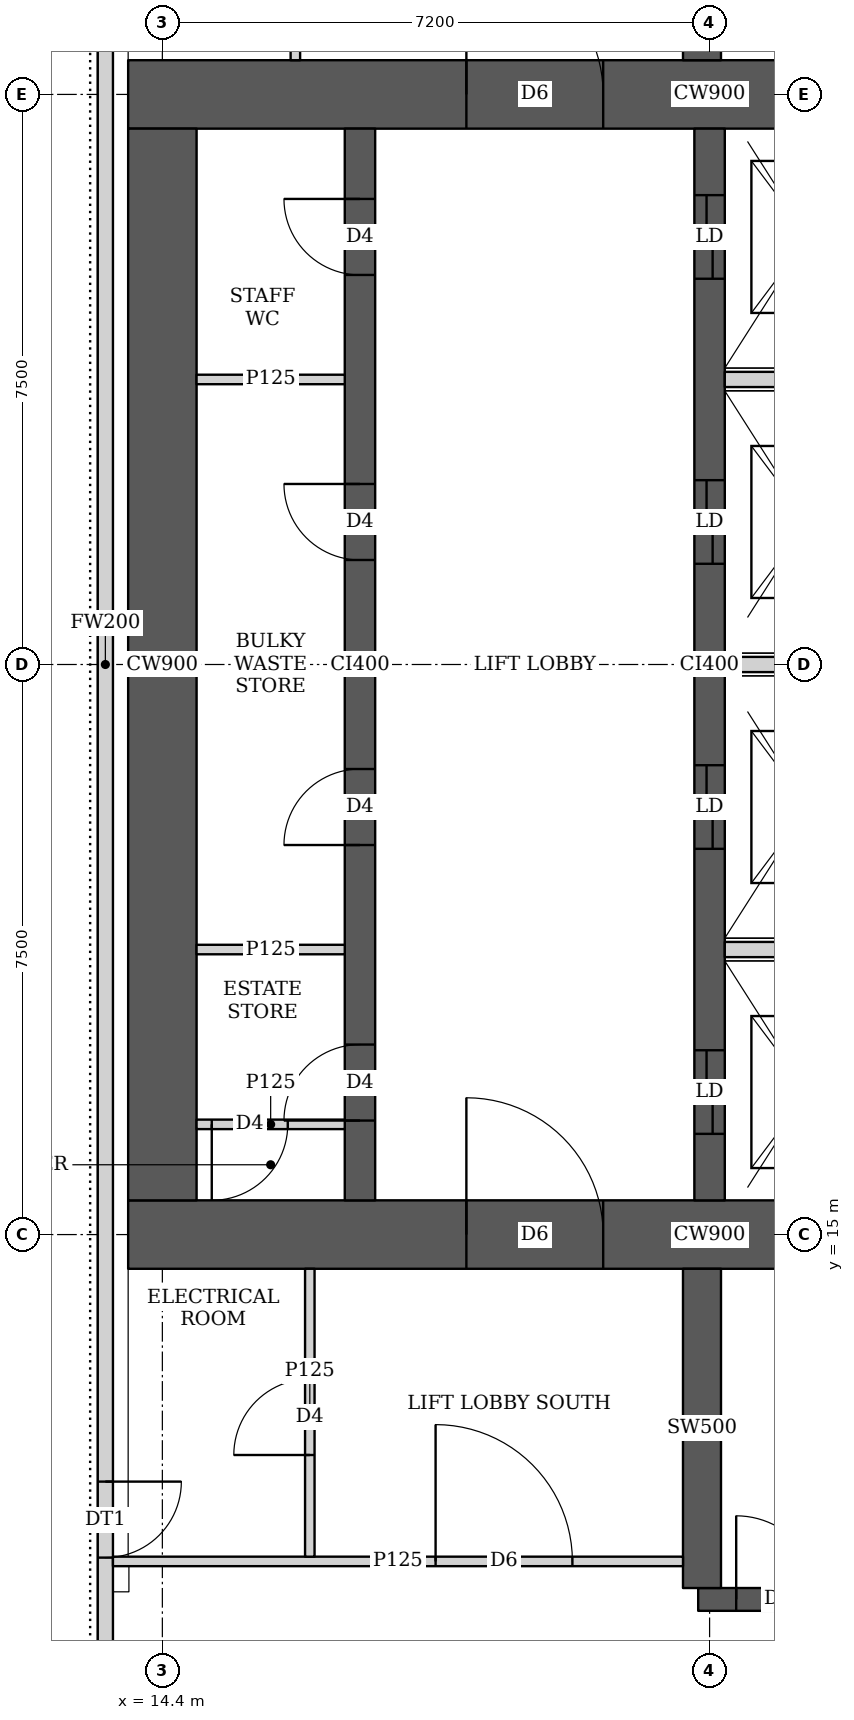
"""IFC4 building model, lengths in metres.
Left out: names, types, materials, properties, quantities, classifications, styles, units other than length and angle.
Written with IfcOpenShell. Run it as: python <this file> out.ifc"""

import sys

from ifc_helpers import new_model, si_unit, direction, frame, frame_2d, origin, place, context, subcontext, project, spatial, rectangle, extrude, element, fill, save


model = new_model("IFC4")
c1 = context("Model", 3, precision=1e-05, world=origin(), true_north=direction((0.0, 1.0)))
c2 = subcontext(c1, "Body", "Model", "MODEL_VIEW")
j1 = project(units=[si_unit("LENGTHUNIT", "METRE"), si_unit("PLANEANGLEUNIT", "RADIAN")], contexts=[c1])
p1 = place(None, origin())
s1 = spatial("IfcSite", under=j1, at=p1, CompositionType="ELEMENT")
p2 = place(p1, origin())
s2 = spatial("IfcBuilding", under=s1, at=p2, CompositionType="ELEMENT")
p3 = place(p2, frame((0.0, 0.0, 223.7)))
s3 = spatial("IfcBuildingStorey", under=s2, at=p3, CompositionType="ELEMENT", Elevation=223.7)
p4 = place(p3, frame((13.95, 15.0, 0.0), z_axis=(0.0, 0.0, 1.0), x_axis=(1.0, 0.0, 0.0)))
e1 = element("IfcWall", 1, at=p4, inside=s3, PredefinedType="SHEAR", context=c2, shape_type="SweptSolid", body=[
    extrude(rectangle(XDim=15.3, YDim=0.9, at=frame_2d((7.65, 0.0))), origin(), (0.0, 0.0, 1.0), 3.75),
])
p5 = place(p4, frame((4.45, 0.0, 0.0)))
e2 = element("IfcOpeningElement", 2, at=p5, cuts=e1, PredefinedType="OPENING", context=c2, shape_type="SweptSolid", body=[
    extrude(rectangle(XDim=1.8, YDim=2.1, at=frame_2d((0.9, 1.05))), frame((0.0, 0.46, 0.0), z_axis=(0.0, -1.0, 0.0), x_axis=(1.0, 0.0, 0.0)), (0.0, 0.0, 1.0), 0.92),
])
p6 = place(p4, frame((10.7, 0.0, 0.0)))
e3 = element("IfcOpeningElement", 3, at=p6, cuts=e1, PredefinedType="OPENING", context=c2, shape_type="SweptSolid", body=[
    extrude(rectangle(XDim=1.1, YDim=2.1, at=frame_2d((0.55, 1.05))), frame((0.0, 0.46, 0.0), z_axis=(0.0, -1.0, 0.0), x_axis=(1.0, 0.0, 0.0)), (0.0, 0.0, 1.0), 0.92),
])
p7 = place(p3, frame((13.95, 30.0, 0.0), z_axis=(0.0, 0.0, 1.0), x_axis=(1.0, 0.0, 0.0)))
e4 = element("IfcWall", 4, at=p7, inside=s3, PredefinedType="SHEAR", context=c2, shape_type="SweptSolid", body=[
    extrude(rectangle(XDim=15.3, YDim=0.9, at=frame_2d((7.65, 0.0))), origin(), (0.0, 0.0, 1.0), 3.75),
])
p8 = place(p7, frame((4.45, 0.0, 0.0)))
e5 = element("IfcOpeningElement", 5, at=p8, cuts=e4, PredefinedType="OPENING", context=c2, shape_type="SweptSolid", body=[
    extrude(rectangle(XDim=1.8, YDim=2.1, at=frame_2d((0.9, 1.05))), frame((0.0, 0.46, 0.0), z_axis=(0.0, -1.0, 0.0), x_axis=(1.0, 0.0, 0.0)), (0.0, 0.0, 1.0), 0.92),
])
p9 = place(p7, frame((10.7, 0.0, 0.0)))
e6 = element("IfcOpeningElement", 6, at=p9, cuts=e4, PredefinedType="OPENING", context=c2, shape_type="SweptSolid", body=[
    extrude(rectangle(XDim=1.1, YDim=2.1, at=frame_2d((0.55, 1.05))), frame((0.0, 0.46, 0.0), z_axis=(0.0, -1.0, 0.0), x_axis=(1.0, 0.0, 0.0)), (0.0, 0.0, 1.0), 0.92),
])
p10 = place(p3, frame((14.4, 15.45, 0.0), z_axis=(0.0, 0.0, 1.0), x_axis=(0.0, 1.0, 0.0)))
e7 = element("IfcWall", 7, at=p10, inside=s3, PredefinedType="SHEAR", context=c2, shape_type="SweptSolid", body=[
    extrude(rectangle(XDim=14.1, YDim=0.9, at=frame_2d((7.05, 0.0))), origin(), (0.0, 0.0, 1.0), 3.75),
])
p11 = place(p3, frame((17.0, 15.45, 0.0), z_axis=(0.0, 0.0, 1.0), x_axis=(0.0, 1.0, 0.0)))
e8 = element("IfcWall", 8, at=p11, inside=s3, PredefinedType="SHEAR", context=c2, shape_type="SweptSolid", body=[
    extrude(rectangle(XDim=14.1, YDim=0.4, at=frame_2d((7.05, 0.0))), origin(), (0.0, 0.0, 1.0), 3.75),
])
p12 = place(p11, frame((1.05, 0.0, 0.0)))
e9 = element("IfcOpeningElement", 9, at=p12, cuts=e8, PredefinedType="OPENING", context=c2, shape_type="SweptSolid", body=[
    extrude(rectangle(XDim=1.0, YDim=2.1, at=frame_2d((0.5, 1.05))), frame((0.0, 0.21, 0.0), z_axis=(0.0, -1.0, 0.0), x_axis=(1.0, 0.0, 0.0)), (0.0, 0.0, 1.0), 0.42),
])
p13 = place(p11, frame((4.675, 0.0, 0.0)))
e10 = element("IfcOpeningElement", 10, at=p13, cuts=e8, PredefinedType="OPENING", context=c2, shape_type="SweptSolid", body=[
    extrude(rectangle(XDim=1.0, YDim=2.1, at=frame_2d((0.5, 1.05))), frame((0.0, 0.21, 0.0), z_axis=(0.0, -1.0, 0.0), x_axis=(1.0, 0.0, 0.0)), (0.0, 0.0, 1.0), 0.42),
])
p14 = place(p11, frame((8.425, 0.0, 0.0)))
e11 = element("IfcOpeningElement", 11, at=p14, cuts=e8, PredefinedType="OPENING", context=c2, shape_type="SweptSolid", body=[
    extrude(rectangle(XDim=1.0, YDim=2.1, at=frame_2d((0.5, 1.05))), frame((0.0, 0.21, 0.0), z_axis=(0.0, -1.0, 0.0), x_axis=(1.0, 0.0, 0.0)), (0.0, 0.0, 1.0), 0.42),
])
p15 = place(p11, frame((12.175, 0.0, 0.0)))
e12 = element("IfcOpeningElement", 12, at=p15, cuts=e8, PredefinedType="OPENING", context=c2, shape_type="SweptSolid", body=[
    extrude(rectangle(XDim=1.0, YDim=2.1, at=frame_2d((0.5, 1.05))), frame((0.0, 0.21, 0.0), z_axis=(0.0, -1.0, 0.0), x_axis=(1.0, 0.0, 0.0)), (0.0, 0.0, 1.0), 0.42),
])
p16 = place(p3, frame((21.6, 15.45, 0.0), z_axis=(0.0, 0.0, 1.0), x_axis=(0.0, 1.0, 0.0)))
e13 = element("IfcWall", 13, at=p16, inside=s3, PredefinedType="SHEAR", context=c2, shape_type="SweptSolid", body=[
    extrude(rectangle(XDim=14.1, YDim=0.4, at=frame_2d((7.05, 0.0))), origin(), (0.0, 0.0, 1.0), 3.75),
])
p17 = place(p16, frame((0.875, 0.0, 0.0)))
e14 = element("IfcOpeningElement", 14, at=p17, cuts=e13, PredefinedType="OPENING", context=c2, shape_type="SweptSolid", body=[
    extrude(rectangle(XDim=1.1, YDim=2.1, at=frame_2d((0.55, 1.05))), frame((0.0, 0.21, 0.0), z_axis=(0.0, -1.0, 0.0), x_axis=(1.0, 0.0, 0.0)), (0.0, 0.0, 1.0), 0.42),
])
p18 = place(p16, frame((4.625, 0.0, 0.0)))
e15 = element("IfcOpeningElement", 15, at=p18, cuts=e13, PredefinedType="OPENING", context=c2, shape_type="SweptSolid", body=[
    extrude(rectangle(XDim=1.1, YDim=2.1, at=frame_2d((0.55, 1.05))), frame((0.0, 0.21, 0.0), z_axis=(0.0, -1.0, 0.0), x_axis=(1.0, 0.0, 0.0)), (0.0, 0.0, 1.0), 0.42),
])
p19 = place(p16, frame((8.375, 0.0, 0.0)))
e16 = element("IfcOpeningElement", 16, at=p19, cuts=e13, PredefinedType="OPENING", context=c2, shape_type="SweptSolid", body=[
    extrude(rectangle(XDim=1.1, YDim=2.1, at=frame_2d((0.55, 1.05))), frame((0.0, 0.21, 0.0), z_axis=(0.0, -1.0, 0.0), x_axis=(1.0, 0.0, 0.0)), (0.0, 0.0, 1.0), 0.42),
])
p20 = place(p16, frame((12.125, 0.0, 0.0)))
e17 = element("IfcOpeningElement", 17, at=p20, cuts=e13, PredefinedType="OPENING", context=c2, shape_type="SweptSolid", body=[
    extrude(rectangle(XDim=1.1, YDim=2.1, at=frame_2d((0.55, 1.05))), frame((0.0, 0.21, 0.0), z_axis=(0.0, -1.0, 0.0), x_axis=(1.0, 0.0, 0.0)), (0.0, 0.0, 1.0), 0.42),
])
p21 = place(p3, frame((21.45, 10.2, 0.0), z_axis=(0.0, 0.0, 1.0), x_axis=(1.0, 0.0, 0.0)))
e18 = element("IfcWall", 18, at=p21, inside=s3, PredefinedType="SHEAR", context=c2, shape_type="SweptSolid", body=[
    extrude(rectangle(XDim=7.5, YDim=0.3, at=frame_2d((3.75, 0.0))), origin(), (0.0, 0.0, 1.0), 3.75),
])
p22 = place(p21, frame((0.5, 0.0, 0.0)))
e19 = element("IfcOpeningElement", 19, at=p22, cuts=e18, PredefinedType="OPENING", context=c2, shape_type="SweptSolid", body=[
    extrude(rectangle(XDim=1.1, YDim=2.1, at=frame_2d((0.55, 1.05))), frame((0.0, 0.16, 0.0), z_axis=(0.0, -1.0, 0.0), x_axis=(1.0, 0.0, 0.0)), (0.0, 0.0, 1.0), 0.32),
])
for number, where, z_axis, x_axis in (
    (20, (21.5, 10.35, 0.0), (0.0, 0.0, 1.0), (0.0, 1.0, 0.0)),
    (21, (21.5, 30.45, 0.0), (0.0, 0.0, 1.0), (0.0, 1.0, 0.0)),
):
    element("IfcWall", number, at=place(p3, frame(where, z_axis=z_axis, x_axis=x_axis)), inside=s3, PredefinedType="SHEAR", context=c2, shape_type="SweptSolid", body=[
        extrude(rectangle(XDim=4.2, YDim=0.5, at=frame_2d((2.1, 0.0))), origin(), (0.0, 0.0, 1.0), 3.75),
    ])
p23 = place(p3, frame((13.65, 44.837, 0.0), z_axis=(0.0, 0.0, 1.0), x_axis=(0.0, -1.0, 0.0)))
e22 = element("IfcWall", 22, at=p23, inside=s3, PredefinedType="SOLIDWALL", context=c2, shape_type="SweptSolid", body=[
    extrude(rectangle(XDim=44.674, YDim=0.2, at=frame_2d((22.337, 0.0))), origin(), (0.0, 0.0, 1.0), 3.5),
])
p24 = place(p23, frame((2.614, 0.0, 0.9)))
e23 = element("IfcOpeningElement", 23, at=p24, cuts=e22, PredefinedType="OPENING", context=c2, shape_type="SweptSolid", body=[
    extrude(rectangle(XDim=2.4, YDim=1.5, at=frame_2d((1.2, 0.75))), frame((0.0, 0.11, 0.0), z_axis=(0.0, -1.0, 0.0), x_axis=(1.0, 0.0, 0.0)), (0.0, 0.0, 1.0), 0.22),
])
p25 = place(p23, frame((39.333, 0.0, 0.9)))
e24 = element("IfcOpeningElement", 24, at=p25, cuts=e22, PredefinedType="OPENING", context=c2, shape_type="SweptSolid", body=[
    extrude(rectangle(XDim=2.4, YDim=1.5, at=frame_2d((1.2, 0.75))), frame((0.0, 0.11, 0.0), z_axis=(0.0, -1.0, 0.0), x_axis=(1.0, 0.0, 0.0)), (0.0, 0.0, 1.0), 0.22),
])
p26 = place(p23, frame((33.087, 0.0, 0.0)))
e25 = element("IfcOpeningElement", 25, at=p26, cuts=e22, PredefinedType="OPENING", context=c2, shape_type="SweptSolid", body=[
    extrude(rectangle(XDim=1.0, YDim=2.4, at=frame_2d((0.5, 1.2))), frame((0.0, 0.11, 0.0), z_axis=(0.0, -1.0, 0.0), x_axis=(1.0, 0.0, 0.0)), (0.0, 0.0, 1.0), 0.22),
])
p27 = place(p23, frame((10.587, 0.0, 0.0)))
e26 = element("IfcOpeningElement", 26, at=p27, cuts=e22, PredefinedType="OPENING", context=c2, shape_type="SweptSolid", body=[
    extrude(rectangle(XDim=1.0, YDim=2.4, at=frame_2d((0.5, 1.2))), frame((0.0, 0.11, 0.0), z_axis=(0.0, -1.0, 0.0), x_axis=(1.0, 0.0, 0.0)), (0.0, 0.0, 1.0), 0.22),
])
p28 = place(p3, frame((13.75, 10.7, 0.0), z_axis=(0.0, 0.0, 1.0), x_axis=(1.0, 0.0, 0.0)))
e27 = element("IfcWall", 27, at=p28, inside=s3, PredefinedType="PARTITIONING", context=c2, shape_type="SweptSolid", body=[
    extrude(rectangle(XDim=7.5, YDim=0.125, at=frame_2d((3.75, 0.0))), origin(), (0.0, 0.0, 1.0), 3.5),
])
p29 = place(p28, frame((4.245, 0.0, 0.0)))
e28 = element("IfcOpeningElement", 28, at=p29, cuts=e27, PredefinedType="OPENING", context=c2, shape_type="SweptSolid", body=[
    extrude(rectangle(XDim=1.8, YDim=2.1, at=frame_2d((0.9, 1.05))), frame((0.0, 0.073, 0.0), z_axis=(0.0, -1.0, 0.0), x_axis=(1.0, 0.0, 0.0)), (0.0, 0.0, 1.0), 0.145),
])
p30 = place(p3, frame((16.34, 10.762, 0.0), z_axis=(0.0, 0.0, 1.0), x_axis=(0.0, 1.0, 0.0)))
e29 = element("IfcWall", 29, at=p30, inside=s3, PredefinedType="PARTITIONING", context=c2, shape_type="SweptSolid", body=[
    extrude(rectangle(XDim=3.788, YDim=0.125, at=frame_2d((1.894, 0.0))), origin(), (0.0, 0.0, 1.0), 3.5),
])
p31 = place(p30, frame((1.338, 0.0, 0.0)))
e30 = element("IfcOpeningElement", 30, at=p31, cuts=e29, PredefinedType="OPENING", context=c2, shape_type="SweptSolid", body=[
    extrude(rectangle(XDim=1.0, YDim=2.1, at=frame_2d((0.5, 1.05))), frame((0.0, 0.073, 0.0), z_axis=(0.0, -1.0, 0.0), x_axis=(1.0, 0.0, 0.0)), (0.0, 0.0, 1.0), 0.145),
])
p32 = place(p3, frame((16.15, 30.45, 0.0), z_axis=(0.0, 0.0, 1.0), x_axis=(0.0, 1.0, 0.0)))
e31 = element("IfcWall", 31, at=p32, inside=s3, PredefinedType="PARTITIONING", context=c2, shape_type="SweptSolid", body=[
    extrude(rectangle(XDim=4.137, YDim=0.125, at=frame_2d((2.068, 0.0))), origin(), (0.0, 0.0, 1.0), 3.5),
])
p33 = place(p32, frame((1.625, 0.0, 0.0)))
e32 = element("IfcOpeningElement", 32, at=p33, cuts=e31, PredefinedType="OPENING", context=c2, shape_type="SweptSolid", body=[
    extrude(rectangle(XDim=1.0, YDim=2.1, at=frame_2d((0.5, 1.05))), frame((0.0, 0.073, 0.0), z_axis=(0.0, -1.0, 0.0), x_axis=(1.0, 0.0, 0.0)), (0.0, 0.0, 1.0), 0.145),
])
p34 = place(p3, frame((14.85, 16.45, 0.0), z_axis=(0.0, 0.0, 1.0), x_axis=(1.0, 0.0, 0.0)))
e33 = element("IfcWall", 33, at=p34, inside=s3, PredefinedType="PARTITIONING", context=c2, shape_type="SweptSolid", body=[
    extrude(rectangle(XDim=1.95, YDim=0.125, at=frame_2d((0.975, 0.0))), origin(), (0.0, 0.0, 1.0), 3.5),
])
p35 = place(p34, frame((0.2, 0.0, 0.0)))
e34 = element("IfcOpeningElement", 34, at=p35, cuts=e33, PredefinedType="OPENING", context=c2, shape_type="SweptSolid", body=[
    extrude(rectangle(XDim=1.0, YDim=2.1, at=frame_2d((0.5, 1.05))), frame((0.0, 0.073, 0.0), z_axis=(0.0, -1.0, 0.0), x_axis=(1.0, 0.0, 0.0)), (0.0, 0.0, 1.0), 0.145),
])
for number, where, z_axis, x_axis in (
    (35, (14.85, 18.75, 0.0), (0.0, 0.0, 1.0), (1.0, 0.0, 0.0)),
    (36, (14.85, 26.25, 0.0), (0.0, 0.0, 1.0), (1.0, 0.0, 0.0)),
):
    element("IfcWall", number, at=place(p3, frame(where, z_axis=z_axis, x_axis=x_axis)), inside=s3, PredefinedType="PARTITIONING", context=c2, shape_type="SweptSolid", body=[
        extrude(rectangle(XDim=1.95, YDim=0.125, at=frame_2d((0.975, 0.0))), origin(), (0.0, 0.0, 1.0), 3.5),
    ])
for number, where, z_axis, x_axis in (
    (37, (21.8, 18.75, 0.0), (0.0, 0.0, 1.0), (1.0, 0.0, 0.0)),
    (38, (21.8, 22.5, 0.0), (0.0, 0.0, 1.0), (1.0, 0.0, 0.0)),
    (39, (21.8, 26.25, 0.0), (0.0, 0.0, 1.0), (1.0, 0.0, 0.0)),
):
    element("IfcWall", number, at=place(p3, frame(where, z_axis=z_axis, x_axis=x_axis)), inside=s3, PredefinedType="SOLIDWALL", context=c2, shape_type="SweptSolid", body=[
        extrude(rectangle(XDim=2.2, YDim=0.2, at=frame_2d((1.1, 0.0))), origin(), (0.0, 0.0, 1.0), 3.5),
    ])
p36 = place(p26, origin())
e40 = element("IfcDoor", 40, at=p36, inside=s3, OperationType="SINGLE_SWING_RIGHT", PredefinedType="DOOR", context=c2, shape_type="SweptSolid", body=[
    extrude(rectangle(XDim=1.0, YDim=2.4, at=frame_2d((0.5, 1.2))), frame((0.0, 0.025, 0.0), z_axis=(0.0, -1.0, 0.0), x_axis=(1.0, 0.0, 0.0)), (0.0, 0.0, 1.0), 0.05),
])
fill(e25, e40)
p37 = place(p31, origin())
e41 = element("IfcDoor", 41, at=p37, inside=s3, OperationType="SINGLE_SWING_LEFT", PredefinedType="DOOR", context=c2, shape_type="SweptSolid", body=[
    extrude(rectangle(XDim=1.0, YDim=2.1, at=frame_2d((0.5, 1.05))), frame((0.0, 0.025, 0.0), z_axis=(0.0, -1.0, 0.0), x_axis=(1.0, 0.0, 0.0)), (0.0, 0.0, 1.0), 0.05),
])
fill(e30, e41)
p38 = place(p29, origin())
e42 = element("IfcDoor", 42, at=p38, inside=s3, OperationType="DOUBLE_DOOR_SINGLE_SWING", PredefinedType="DOOR", context=c2, shape_type="SweptSolid", body=[
    extrude(rectangle(XDim=1.8, YDim=2.1, at=frame_2d((0.9, 1.05))), frame((0.0, 0.025, 0.0), z_axis=(0.0, -1.0, 0.0), x_axis=(1.0, 0.0, 0.0)), (0.0, 0.0, 1.0), 0.05),
])
fill(e28, e42)
p39 = place(p35, origin())
e43 = element("IfcDoor", 43, at=p39, inside=s3, OperationType="SINGLE_SWING_RIGHT", PredefinedType="DOOR", context=c2, shape_type="SweptSolid", body=[
    extrude(rectangle(XDim=1.0, YDim=2.1, at=frame_2d((0.5, 1.05))), frame((0.0, 0.025, 0.0), z_axis=(0.0, -1.0, 0.0), x_axis=(1.0, 0.0, 0.0)), (0.0, 0.0, 1.0), 0.05),
])
fill(e34, e43)
p40 = place(p12, origin())
e44 = element("IfcDoor", 44, at=p40, inside=s3, OperationType="SINGLE_SWING_LEFT", PredefinedType="DOOR", context=c2, shape_type="SweptSolid", body=[
    extrude(rectangle(XDim=1.0, YDim=2.1, at=frame_2d((0.5, 1.05))), frame((0.0, 0.025, 0.0), z_axis=(0.0, -1.0, 0.0), x_axis=(1.0, 0.0, 0.0)), (0.0, 0.0, 1.0), 0.05),
])
fill(e9, e44)
p41 = place(p13, origin())
e45 = element("IfcDoor", 45, at=p41, inside=s3, OperationType="SINGLE_SWING_LEFT", PredefinedType="DOOR", context=c2, shape_type="SweptSolid", body=[
    extrude(rectangle(XDim=1.0, YDim=2.1, at=frame_2d((0.5, 1.05))), frame((0.0, 0.025, 0.0), z_axis=(0.0, -1.0, 0.0), x_axis=(1.0, 0.0, 0.0)), (0.0, 0.0, 1.0), 0.05),
])
fill(e10, e45)
p42 = place(p14, origin())
e46 = element("IfcDoor", 46, at=p42, inside=s3, OperationType="SINGLE_SWING_RIGHT", PredefinedType="DOOR", context=c2, shape_type="SweptSolid", body=[
    extrude(rectangle(XDim=1.0, YDim=2.1, at=frame_2d((0.5, 1.05))), frame((0.0, 0.025, 0.0), z_axis=(0.0, -1.0, 0.0), x_axis=(1.0, 0.0, 0.0)), (0.0, 0.0, 1.0), 0.05),
])
fill(e11, e46)
p43 = place(p15, origin())
e47 = element("IfcDoor", 47, at=p43, inside=s3, OperationType="SINGLE_SWING_RIGHT", PredefinedType="DOOR", context=c2, shape_type="SweptSolid", body=[
    extrude(rectangle(XDim=1.0, YDim=2.1, at=frame_2d((0.5, 1.05))), frame((0.0, 0.025, 0.0), z_axis=(0.0, -1.0, 0.0), x_axis=(1.0, 0.0, 0.0)), (0.0, 0.0, 1.0), 0.05),
])
fill(e12, e47)
p44 = place(p5, origin())
e48 = element("IfcDoor", 48, at=p44, inside=s3, OperationType="DOUBLE_DOOR_SINGLE_SWING", PredefinedType="DOOR", context=c2, shape_type="SweptSolid", body=[
    extrude(rectangle(XDim=1.8, YDim=2.1, at=frame_2d((0.9, 1.05))), frame((0.0, 0.025, 0.0), z_axis=(0.0, -1.0, 0.0), x_axis=(1.0, 0.0, 0.0)), (0.0, 0.0, 1.0), 0.05),
])
fill(e2, e48)
p45 = place(p8, origin())
e49 = element("IfcDoor", 49, at=p45, inside=s3, OperationType="DOUBLE_DOOR_SINGLE_SWING", PredefinedType="DOOR", context=c2, shape_type="SweptSolid", body=[
    extrude(rectangle(XDim=1.8, YDim=2.1, at=frame_2d((0.9, 1.05))), frame((0.0, 0.025, 0.0), z_axis=(0.0, -1.0, 0.0), x_axis=(1.0, 0.0, 0.0)), (0.0, 0.0, 1.0), 0.05),
])
fill(e5, e49)
p46 = place(p17, origin())
e50 = element("IfcDoor", 50, at=p46, inside=s3, OperationType="DOUBLE_DOOR_SLIDING", PredefinedType="DOOR", context=c2, shape_type="SweptSolid", body=[
    extrude(rectangle(XDim=1.1, YDim=2.1, at=frame_2d((0.55, 1.05))), frame((0.0, 0.025, 0.0), z_axis=(0.0, -1.0, 0.0), x_axis=(1.0, 0.0, 0.0)), (0.0, 0.0, 1.0), 0.05),
])
fill(e14, e50)
p47 = place(p18, origin())
e51 = element("IfcDoor", 51, at=p47, inside=s3, OperationType="DOUBLE_DOOR_SLIDING", PredefinedType="DOOR", context=c2, shape_type="SweptSolid", body=[
    extrude(rectangle(XDim=1.1, YDim=2.1, at=frame_2d((0.55, 1.05))), frame((0.0, 0.025, 0.0), z_axis=(0.0, -1.0, 0.0), x_axis=(1.0, 0.0, 0.0)), (0.0, 0.0, 1.0), 0.05),
])
fill(e15, e51)
p48 = place(p19, origin())
e52 = element("IfcDoor", 52, at=p48, inside=s3, OperationType="DOUBLE_DOOR_SLIDING", PredefinedType="DOOR", context=c2, shape_type="SweptSolid", body=[
    extrude(rectangle(XDim=1.1, YDim=2.1, at=frame_2d((0.55, 1.05))), frame((0.0, 0.025, 0.0), z_axis=(0.0, -1.0, 0.0), x_axis=(1.0, 0.0, 0.0)), (0.0, 0.0, 1.0), 0.05),
])
fill(e16, e52)
p49 = place(p20, origin())
e53 = element("IfcDoor", 53, at=p49, inside=s3, OperationType="DOUBLE_DOOR_SLIDING", PredefinedType="DOOR", context=c2, shape_type="SweptSolid", body=[
    extrude(rectangle(XDim=1.1, YDim=2.1, at=frame_2d((0.55, 1.05))), frame((0.0, 0.025, 0.0), z_axis=(0.0, -1.0, 0.0), x_axis=(1.0, 0.0, 0.0)), (0.0, 0.0, 1.0), 0.05),
])
fill(e17, e53)
p50 = place(p22, origin())
e54 = element("IfcDoor", 54, at=p50, inside=s3, OperationType="SINGLE_SWING_LEFT", PredefinedType="DOOR", context=c2, shape_type="SweptSolid", body=[
    extrude(rectangle(XDim=1.1, YDim=2.1, at=frame_2d((0.55, 1.05))), frame((0.0, 0.025, 0.0), z_axis=(0.0, -1.0, 0.0), x_axis=(1.0, 0.0, 0.0)), (0.0, 0.0, 1.0), 0.05),
])
fill(e19, e54)
save(model, sys.argv[1])
